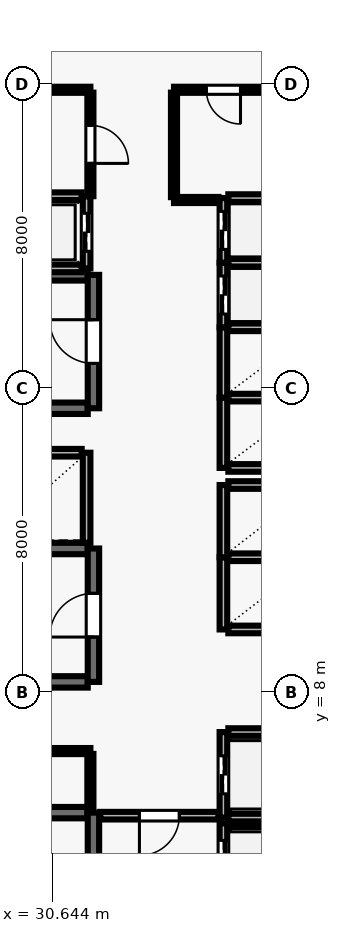
"""IFC4 building model, lengths in metres.
Left out: names, types, materials, properties, quantities, classifications, styles, units other than length and angle.
Written with IfcOpenShell. Run it as: python <this file> out.ifc"""

import sys

from ifc_helpers import new_model, si_unit, direction, frame, frame_2d, origin, place, context, subcontext, project, spatial, rectangle, extrude, element, fill, save


model = new_model("IFC4")
c1 = context("Model", 3, precision=1e-05, world=origin(), true_north=direction((0.0, 1.0)))
c2 = subcontext(c1, "Body", "Model", "MODEL_VIEW")
j1 = project(units=[si_unit("LENGTHUNIT", "METRE"), si_unit("PLANEANGLEUNIT", "RADIAN")], contexts=[c1])
p1 = place(None, origin())
s1 = spatial("IfcSite", under=j1, at=p1, CompositionType="ELEMENT")
p2 = place(p1, origin())
s2 = spatial("IfcBuilding", under=s1, at=p2, CompositionType="ELEMENT")
p3 = place(p2, frame((0.0, 0.0, 154.1)))
s3 = spatial("IfcBuildingStorey", under=s2, at=p3, CompositionType="ELEMENT", Elevation=154.1)
p4 = place(p3, frame((31.58, 4.83, 0.0), z_axis=(0.0, 0.0, 1.0), x_axis=(-1.0, 0.0, 0.0)))
e1 = element("IfcWall", 1, at=p4, inside=s3, PredefinedType="SHEAR", context=c2, shape_type="SweptSolid", body=[
    extrude(rectangle(XDim=8.36, YDim=0.3, at=frame_2d((4.18, 0.0))), origin(), (0.0, 0.0, 1.0), 3.69),
])
p5 = place(p3, frame((31.73, 0.96, 0.0), z_axis=(0.0, 0.0, 1.0), x_axis=(0.0, 1.0, 0.0)))
e2 = element("IfcWall", 2, at=p5, inside=s3, PredefinedType="SHEAR", context=c2, shape_type="SweptSolid", body=[
    extrude(rectangle(XDim=3.87, YDim=0.3, at=frame_2d((1.935, 0.0))), origin(), (0.0, 0.0, 1.0), 3.69),
])
p6 = place(p5, frame((1.54, 0.0, 0.0)))
e3 = element("IfcOpeningElement", 3, at=p6, cuts=e2, PredefinedType="OPENING", context=c2, shape_type="SweptSolid", body=[
    extrude(rectangle(XDim=1.15, YDim=2.15, at=frame_2d((0.575, 1.075))), frame((0.0, 0.16, 0.0), z_axis=(0.0, -1.0, 0.0), x_axis=(1.0, 0.0, 0.0)), (0.0, 0.0, 1.0), 0.32),
])
for number, where, z_axis, x_axis in (
    (4, (31.58, 18.98, 0.0), (0.0, 0.0, 1.0), (-1.0, 0.0, 0.0)),
    (5, (23.22, 15.47, 0.0), (0.0, 0.0, 1.0), (1.0, 0.0, 0.0)),
):
    element("IfcWall", number, at=place(p3, frame(where, z_axis=z_axis, x_axis=x_axis)), inside=s3, PredefinedType="SHEAR", context=c2, shape_type="SweptSolid", body=[
        extrude(rectangle(XDim=8.36, YDim=0.3, at=frame_2d((4.18, 0.0))), origin(), (0.0, 0.0, 1.0), 3.69),
    ])
p7 = place(p3, frame((31.73, 15.47, 0.0), z_axis=(0.0, 0.0, 1.0), x_axis=(0.0, 1.0, 0.0)))
e6 = element("IfcWall", 6, at=p7, inside=s3, PredefinedType="SHEAR", context=c2, shape_type="SweptSolid", body=[
    extrude(rectangle(XDim=3.51, YDim=0.3, at=frame_2d((1.755, 0.0))), origin(), (0.0, 0.0, 1.0), 3.69),
])
p8 = place(p7, frame((1.18, 0.0, 0.0)))
e7 = element("IfcOpeningElement", 7, at=p8, cuts=e6, PredefinedType="OPENING", context=c2, shape_type="SweptSolid", body=[
    extrude(rectangle(XDim=1.15, YDim=2.15, at=frame_2d((0.575, 1.075))), frame((0.0, 0.16, 0.0), z_axis=(0.0, -1.0, 0.0), x_axis=(1.0, 0.0, 0.0)), (0.0, 0.0, 1.0), 0.32),
])
for number, where, z_axis, x_axis in (
    (8, (31.58, 11.78, 0.0), (0.0, 0.0, 1.0), (-1.0, 0.0, 0.0)),
    (9, (23.22, 8.27, 0.0), (0.0, 0.0, 1.0), (1.0, 0.0, 0.0)),
):
    element("IfcWall", number, at=place(p3, frame(where, z_axis=z_axis, x_axis=x_axis)), inside=s3, PredefinedType="SHEAR", context=c2, shape_type="SweptSolid", body=[
        extrude(rectangle(XDim=8.36, YDim=0.3, at=frame_2d((4.18, 0.0))), origin(), (0.0, 0.0, 1.0), 3.69),
    ])
p9 = place(p3, frame((31.73, 8.27, 0.0), z_axis=(0.0, 0.0, 1.0), x_axis=(0.0, 1.0, 0.0)))
e10 = element("IfcWall", 10, at=p9, inside=s3, PredefinedType="SHEAR", context=c2, shape_type="SweptSolid", body=[
    extrude(rectangle(XDim=3.51, YDim=0.3, at=frame_2d((1.755, 0.0))), origin(), (0.0, 0.0, 1.0), 3.69),
])
p10 = place(p9, frame((1.18, 0.0, 0.0)))
e11 = element("IfcOpeningElement", 11, at=p10, cuts=e10, PredefinedType="OPENING", context=c2, shape_type="SweptSolid", body=[
    extrude(rectangle(XDim=1.15, YDim=2.15, at=frame_2d((0.575, 1.075))), frame((0.0, 0.16, 0.0), z_axis=(0.0, -1.0, 0.0), x_axis=(1.0, 0.0, 0.0)), (0.0, 0.0, 1.0), 0.32),
])
p11 = place(p3, frame((35.15, 4.55, 0.0), z_axis=(0.0, 0.0, 1.0), x_axis=(0.0, -1.0, 0.0)))
e12 = element("IfcWall", 12, at=p11, inside=s3, PredefinedType="SOLIDWALL", context=c2, shape_type="SweptSolid", body=[
    extrude(rectangle(XDim=2.1, YDim=0.2, at=frame_2d((1.05, 0.0))), origin(), (0.0, 0.0, 1.0), 3.69),
])
p12 = place(p11, frame((0.45, 0.0, 0.0)))
e13 = element("IfcOpeningElement", 13, at=p12, cuts=e12, PredefinedType="OPENING", context=c2, shape_type="SweptSolid", body=[
    extrude(rectangle(XDim=1.2, YDim=2.15, at=frame_2d((0.6, 1.075))), frame((0.0, 0.11, 0.0), z_axis=(0.0, -1.0, 0.0), x_axis=(1.0, 0.0, 0.0)), (0.0, 0.0, 1.0), 0.22),
])
p13 = place(p3, frame((37.42, 4.55, 0.0), z_axis=(0.0, 0.0, 1.0), x_axis=(-1.0, 0.0, 0.0)))
e14 = element("IfcWall", 14, at=p13, inside=s3, PredefinedType="SOLIDWALL", context=c2, shape_type="SweptSolid", body=[
    extrude(rectangle(XDim=2.14, YDim=0.2, at=frame_2d((1.07, 0.0))), origin(), (0.0, 0.0, 1.0), 3.69),
])
p14 = place(p3, frame((35.15, 6.95, 0.0), z_axis=(0.0, 0.0, 1.0), x_axis=(0.0, -1.0, 0.0)))
e15 = element("IfcWall", 15, at=p14, inside=s3, PredefinedType="SOLIDWALL", context=c2, shape_type="SweptSolid", body=[
    extrude(rectangle(XDim=2.25, YDim=0.2, at=frame_2d((1.125, 0.0))), origin(), (0.0, 0.0, 1.0), 3.69),
])
p15 = place(p14, frame((0.625, 0.0, 0.0)))
e16 = element("IfcOpeningElement", 16, at=p15, cuts=e15, PredefinedType="OPENING", context=c2, shape_type="SweptSolid", body=[
    extrude(rectangle(XDim=1.0, YDim=2.1, at=frame_2d((0.5, 1.05))), frame((0.0, 0.11, 0.0), z_axis=(0.0, -1.0, 0.0), x_axis=(1.0, 0.0, 0.0)), (0.0, 0.0, 1.0), 0.22),
])
for number, where, z_axis, x_axis in (
    (17, (35.28, 4.7, 0.0), (0.0, 0.0, 1.0), (1.0, 0.0, 0.0)),
    (18, (37.42, 6.95, 0.0), (0.0, 0.0, 1.0), (-1.0, 0.0, 0.0)),
):
    element("IfcWall", number, at=place(p3, frame(where, z_axis=z_axis, x_axis=x_axis)), inside=s3, PredefinedType="SOLIDWALL", context=c2, shape_type="SweptSolid", body=[
        extrude(rectangle(XDim=2.14, YDim=0.2, at=frame_2d((1.07, 0.0))), origin(), (0.0, 0.0, 1.0), 3.69),
    ])
p16 = place(p3, frame((35.15, 11.55, 0.0), z_axis=(0.0, 0.0, 1.0), x_axis=(0.0, -1.0, 0.0)))
e19 = element("IfcWall", 19, at=p16, inside=s3, PredefinedType="SOLIDWALL", context=c2, shape_type="SweptSolid", body=[
    extrude(rectangle(XDim=1.9, YDim=0.2, at=frame_2d((0.95, 0.0))), origin(), (0.0, 0.0, 1.0), 3.69),
])
for number, where, z_axis, x_axis in (
    (20, (35.28, 9.65, 0.0), (0.0, 0.0, 1.0), (1.0, 0.0, 0.0)),
    (21, (37.42, 11.55, 0.0), (0.0, 0.0, 1.0), (-1.0, 0.0, 0.0)),
):
    element("IfcWall", number, at=place(p3, frame(where, z_axis=z_axis, x_axis=x_axis)), inside=s3, PredefinedType="SOLIDWALL", context=c2, shape_type="SweptSolid", body=[
        extrude(rectangle(XDim=2.14, YDim=0.2, at=frame_2d((1.07, 0.0))), origin(), (0.0, 0.0, 1.0), 3.69),
    ])
p17 = place(p3, frame((35.15, 13.45, 0.0), z_axis=(0.0, 0.0, 1.0), x_axis=(0.0, -1.0, 0.0)))
e22 = element("IfcWall", 22, at=p17, inside=s3, PredefinedType="SOLIDWALL", context=c2, shape_type="SweptSolid", body=[
    extrude(rectangle(XDim=1.9, YDim=0.2, at=frame_2d((0.95, 0.0))), origin(), (0.0, 0.0, 1.0), 3.69),
])
p18 = place(p3, frame((37.42, 13.45, 0.0), z_axis=(0.0, 0.0, 1.0), x_axis=(-1.0, 0.0, 0.0)))
e23 = element("IfcWall", 23, at=p18, inside=s3, PredefinedType="SOLIDWALL", context=c2, shape_type="SweptSolid", body=[
    extrude(rectangle(XDim=2.14, YDim=0.2, at=frame_2d((1.07, 0.0))), origin(), (0.0, 0.0, 1.0), 3.69),
])
p19 = place(p3, frame((31.55, 11.93, 0.0), z_axis=(0.0, 0.0, 1.0), x_axis=(0.0, 1.0, 0.0)))
e24 = element("IfcWall", 24, at=p19, inside=s3, PredefinedType="SOLIDWALL", context=c2, shape_type="SweptSolid", body=[
    extrude(rectangle(XDim=2.37, YDim=0.2, at=frame_2d((1.185, 0.0))), origin(), (0.0, 0.0, 1.0), 3.69),
])
p20 = place(p3, frame((31.42, 14.3, 0.0), z_axis=(0.0, 0.0, 1.0), x_axis=(-1.0, 0.0, 0.0)))
e25 = element("IfcWall", 25, at=p20, inside=s3, PredefinedType="SOLIDWALL", context=c2, shape_type="SweptSolid", body=[
    extrude(rectangle(XDim=2.44, YDim=0.2, at=frame_2d((1.22, 0.0))), origin(), (0.0, 0.0, 1.0), 3.69),
])
p21 = place(p3, frame((35.15, 15.75, 0.0), z_axis=(0.0, 0.0, 1.0), x_axis=(0.0, -1.0, 0.0)))
e26 = element("IfcWall", 26, at=p21, inside=s3, PredefinedType="SOLIDWALL", context=c2, shape_type="SweptSolid", body=[
    extrude(rectangle(XDim=1.85, YDim=0.2, at=frame_2d((0.925, 0.0))), origin(), (0.0, 0.0, 1.0), 3.69),
])
for number, where, z_axis, x_axis in (
    (27, (35.28, 13.9, 0.0), (0.0, 0.0, 1.0), (1.0, 0.0, 0.0)),
    (28, (37.42, 15.75, 0.0), (0.0, 0.0, 1.0), (-1.0, 0.0, 0.0)),
):
    element("IfcWall", number, at=place(p3, frame(where, z_axis=z_axis, x_axis=x_axis)), inside=s3, PredefinedType="SOLIDWALL", context=c2, shape_type="SweptSolid", body=[
        extrude(rectangle(XDim=2.14, YDim=0.2, at=frame_2d((1.07, 0.0))), origin(), (0.0, 0.0, 1.0), 3.69),
    ])
p22 = place(p3, frame((35.15, 17.6, 0.0), z_axis=(0.0, 0.0, 1.0), x_axis=(0.0, -1.0, 0.0)))
e29 = element("IfcWall", 29, at=p22, inside=s3, PredefinedType="SOLIDWALL", context=c2, shape_type="SweptSolid", body=[
    extrude(rectangle(XDim=1.85, YDim=0.2, at=frame_2d((0.925, 0.0))), origin(), (0.0, 0.0, 1.0), 3.69),
])
p23 = place(p3, frame((37.42, 17.6, 0.0), z_axis=(0.0, 0.0, 1.0), x_axis=(-1.0, 0.0, 0.0)))
e30 = element("IfcWall", 30, at=p23, inside=s3, PredefinedType="SOLIDWALL", context=c2, shape_type="SweptSolid", body=[
    extrude(rectangle(XDim=2.14, YDim=0.2, at=frame_2d((1.07, 0.0))), origin(), (0.0, 0.0, 1.0), 3.69),
])
p24 = place(p3, frame((35.15, 19.3, 0.0), z_axis=(0.0, 0.0, 1.0), x_axis=(0.0, -1.0, 0.0)))
e31 = element("IfcWall", 31, at=p24, inside=s3, PredefinedType="SOLIDWALL", context=c2, shape_type="SweptSolid", body=[
    extrude(rectangle(XDim=1.7, YDim=0.2, at=frame_2d((0.85, 0.0))), origin(), (0.0, 0.0, 1.0), 3.69),
])
p25 = place(p24, frame((0.35, 0.0, 0.0)))
e32 = element("IfcOpeningElement", 32, at=p25, cuts=e31, PredefinedType="OPENING", context=c2, shape_type="SweptSolid", body=[
    extrude(rectangle(XDim=1.0, YDim=2.1, at=frame_2d((0.5, 1.05))), frame((0.0, 0.11, 0.0), z_axis=(0.0, -1.0, 0.0), x_axis=(1.0, 0.0, 0.0)), (0.0, 0.0, 1.0), 0.22),
])
p26 = place(p3, frame((37.42, 19.3, 0.0), z_axis=(0.0, 0.0, 1.0), x_axis=(-1.0, 0.0, 0.0)))
e33 = element("IfcWall", 33, at=p26, inside=s3, PredefinedType="SOLIDWALL", context=c2, shape_type="SweptSolid", body=[
    extrude(rectangle(XDim=2.14, YDim=0.2, at=frame_2d((1.07, 0.0))), origin(), (0.0, 0.0, 1.0), 3.69),
])
p27 = place(p3, frame((35.15, 21.0, 0.0), z_axis=(0.0, 0.0, 1.0), x_axis=(0.0, -1.0, 0.0)))
e34 = element("IfcWall", 34, at=p27, inside=s3, PredefinedType="SOLIDWALL", context=c2, shape_type="SweptSolid", body=[
    extrude(rectangle(XDim=1.7, YDim=0.2, at=frame_2d((0.85, 0.0))), origin(), (0.0, 0.0, 1.0), 3.69),
])
p28 = place(p27, frame((0.35, 0.0, 0.0)))
e35 = element("IfcOpeningElement", 35, at=p28, cuts=e34, PredefinedType="OPENING", context=c2, shape_type="SweptSolid", body=[
    extrude(rectangle(XDim=1.0, YDim=2.1, at=frame_2d((0.5, 1.05))), frame((0.0, 0.11, 0.0), z_axis=(0.0, -1.0, 0.0), x_axis=(1.0, 0.0, 0.0)), (0.0, 0.0, 1.0), 0.22),
])
p29 = place(p3, frame((37.42, 21.0, 0.0), z_axis=(0.0, 0.0, 1.0), x_axis=(-1.0, 0.0, 0.0)))
e36 = element("IfcWall", 36, at=p29, inside=s3, PredefinedType="SOLIDWALL", context=c2, shape_type="SweptSolid", body=[
    extrude(rectangle(XDim=2.14, YDim=0.2, at=frame_2d((1.07, 0.0))), origin(), (0.0, 0.0, 1.0), 3.69),
])
p30 = place(p3, frame((31.55, 19.15, 0.0), z_axis=(0.0, 0.0, 1.0), x_axis=(0.0, 1.0, 0.0)))
e37 = element("IfcWall", 37, at=p30, inside=s3, PredefinedType="SOLIDWALL", context=c2, shape_type="SweptSolid", body=[
    extrude(rectangle(XDim=1.9, YDim=0.2, at=frame_2d((0.95, 0.0))), origin(), (0.0, 0.0, 1.0), 3.69),
])
p31 = place(p30, frame((0.45, 0.0, 0.0)))
e38 = element("IfcOpeningElement", 38, at=p31, cuts=e37, PredefinedType="OPENING", context=c2, shape_type="SweptSolid", body=[
    extrude(rectangle(XDim=1.0, YDim=2.1, at=frame_2d((0.5, 1.05))), frame((0.0, 0.11, 0.0), z_axis=(0.0, -1.0, 0.0), x_axis=(1.0, 0.0, 0.0)), (0.0, 0.0, 1.0), 0.22),
])
for number, where, z_axis, x_axis in (
    (39, (28.98, 19.15, 0.0), (0.0, 0.0, 1.0), (1.0, 0.0, 0.0)),
    (40, (31.42, 21.05, 0.0), (0.0, 0.0, 1.0), (-1.0, 0.0, 0.0)),
):
    element("IfcWall", number, at=place(p3, frame(where, z_axis=z_axis, x_axis=x_axis)), inside=s3, PredefinedType="SOLIDWALL", context=c2, shape_type="SweptSolid", body=[
        extrude(rectangle(XDim=2.44, YDim=0.2, at=frame_2d((1.22, 0.0))), origin(), (0.0, 0.0, 1.0), 3.69),
    ])
p32 = place(p3, frame((28.55, 6.45, 0.0), z_axis=(0.0, 0.0, 1.0), x_axis=(1.0, 0.0, 0.0)))
e41 = element("IfcWall", 41, at=p32, inside=s3, PredefinedType="PARTITIONING", context=c2, shape_type="SweptSolid", body=[
    extrude(rectangle(XDim=3.1, YDim=0.16, at=frame_2d((1.55, 0.0))), origin(), (0.0, 0.0, 1.0), 3.69),
])
p33 = place(p32, frame((1.11, 0.0, 0.0)))
e42 = element("IfcOpeningElement", 42, at=p33, cuts=e41, PredefinedType="OPENING", context=c2, shape_type="SweptSolid", body=[
    extrude(rectangle(XDim=0.88, YDim=2.1, at=frame_2d((0.44, 1.05))), frame((0.0, 0.09, 0.0), z_axis=(0.0, -1.0, 0.0), x_axis=(1.0, 0.0, 0.0)), (0.0, 0.0, 1.0), 0.18),
])
p34 = place(p3, frame((31.65, 23.85, 0.0), z_axis=(0.0, 0.0, 1.0), x_axis=(-1.0, 0.0, 0.0)))
e43 = element("IfcWall", 43, at=p34, inside=s3, PredefinedType="PARTITIONING", context=c2, shape_type="SweptSolid", body=[
    extrude(rectangle(XDim=2.85, YDim=0.16, at=frame_2d((1.425, 0.0))), origin(), (0.0, 0.0, 1.0), 3.073),
])
p35 = place(p3, frame((35.02, 4.75, 0.0), z_axis=(0.0, 0.0, 1.0), x_axis=(-1.0, 0.0, 0.0)))
e44 = element("IfcWall", 44, at=p35, inside=s3, PredefinedType="SOLIDWALL", context=c2, shape_type="SweptSolid", body=[
    extrude(rectangle(XDim=3.11, YDim=0.2, at=frame_2d((1.555, 0.0))), origin(), (0.0, 0.0, 1.0), 3.69),
])
p36 = place(p35, frame((1.03, 0.0, 0.0)))
e45 = element("IfcOpeningElement", 45, at=p36, cuts=e44, PredefinedType="OPENING", context=c2, shape_type="SweptSolid", body=[
    extrude(rectangle(XDim=1.05, YDim=2.15, at=frame_2d((0.525, 1.075))), frame((0.0, 0.11, 0.0), z_axis=(0.0, -1.0, 0.0), x_axis=(1.0, 0.0, 0.0)), (0.0, 0.0, 1.0), 0.22),
])
p37 = place(p3, frame((35.02, 20.95, 0.0), z_axis=(0.0, 0.0, 1.0), x_axis=(-1.0, 0.0, 0.0)))
e46 = element("IfcWall", 46, at=p37, inside=s3, PredefinedType="PARTITIONING", context=c2, shape_type="SweptSolid", body=[
    extrude(rectangle(XDim=1.17, YDim=0.16, at=frame_2d((0.585, 0.0))), origin(), (0.0, 0.0, 1.0), 3.69),
])
p38 = place(p3, frame((37.85, 23.85, 0.0), z_axis=(0.0, 0.0, 1.0), x_axis=(-1.0, 0.0, 0.0)))
e47 = element("IfcWall", 47, at=p38, inside=s3, PredefinedType="PARTITIONING", context=c2, shape_type="SweptSolid", body=[
    extrude(rectangle(XDim=4.0, YDim=0.16, at=frame_2d((2.0, 0.0))), origin(), (0.0, 0.0, 1.0), 3.073),
])
p39 = place(p38, frame((2.25, 0.0, 0.0)))
e48 = element("IfcOpeningElement", 48, at=p39, cuts=e47, PredefinedType="OPENING", context=c2, shape_type="SweptSolid", body=[
    extrude(rectangle(XDim=0.9, YDim=2.1, at=frame_2d((0.45, 1.05))), frame((0.0, 0.09, 0.0), z_axis=(0.0, -1.0, 0.0), x_axis=(1.0, 0.0, 0.0)), (0.0, 0.0, 1.0), 0.18),
])
p40 = place(p3, frame((31.65, 4.86, 0.0), z_axis=(0.0, 0.0, 1.0), x_axis=(0.0, 1.0, 0.0)))
e49 = element("IfcWall", 49, at=p40, inside=s3, PredefinedType="PARTITIONING", context=c2, shape_type="SweptSolid", body=[
    extrude(rectangle(XDim=1.515, YDim=0.16, at=frame_2d((0.757, 0.0))), origin(), (0.0, 0.0, 1.0), 3.69),
])
p41 = place(p3, frame((31.65, 23.775, 0.0), z_axis=(0.0, 0.0, 1.0), x_axis=(0.0, -1.0, 0.0)))
e50 = element("IfcWall", 50, at=p41, inside=s3, PredefinedType="PARTITIONING", context=c2, shape_type="SweptSolid", body=[
    extrude(rectangle(XDim=2.725, YDim=0.16, at=frame_2d((1.362, 0.0))), origin(), (0.0, 0.0, 1.0), 3.69),
])
p42 = place(p41, frame((0.862, 0.0, 0.0)))
e51 = element("IfcOpeningElement", 51, at=p42, cuts=e50, PredefinedType="OPENING", context=c2, shape_type="SweptSolid", body=[
    extrude(rectangle(XDim=1.0, YDim=2.1, at=frame_2d((0.5, 1.05))), frame((0.0, 0.09, 0.0), z_axis=(0.0, -1.0, 0.0), x_axis=(1.0, 0.0, 0.0)), (0.0, 0.0, 1.0), 0.18),
])
p43 = place(p3, frame((33.85, 21.025, 0.0), z_axis=(0.0, 0.0, 1.0), x_axis=(0.0, 1.0, 0.0)))
e52 = element("IfcWall", 52, at=p43, inside=s3, PredefinedType="PARTITIONING", context=c2, shape_type="SweptSolid", body=[
    extrude(rectangle(XDim=2.75, YDim=0.16, at=frame_2d((1.375, 0.0))), origin(), (0.0, 0.0, 1.0), 3.69),
])
p44 = place(p8, origin())
e53 = element("IfcDoor", 53, at=p44, inside=s3, OperationType="SINGLE_SWING_RIGHT", PredefinedType="DOOR", context=c2, shape_type="SweptSolid", body=[
    extrude(rectangle(XDim=1.15, YDim=2.15, at=frame_2d((0.575, 1.075))), frame((0.0, 0.025, 0.0), z_axis=(0.0, -1.0, 0.0), x_axis=(1.0, 0.0, 0.0)), (0.0, 0.0, 1.0), 0.05),
])
fill(e7, e53)
p45 = place(p10, origin())
e54 = element("IfcDoor", 54, at=p45, inside=s3, OperationType="SINGLE_SWING_LEFT", PredefinedType="DOOR", context=c2, shape_type="SweptSolid", body=[
    extrude(rectangle(XDim=1.15, YDim=2.15, at=frame_2d((0.575, 1.075))), frame((0.0, 0.025, 0.0), z_axis=(0.0, -1.0, 0.0), x_axis=(1.0, 0.0, 0.0)), (0.0, 0.0, 1.0), 0.05),
])
fill(e11, e54)
p46 = place(p12, origin())
e55 = element("IfcDoor", 55, at=p46, inside=s3, OperationType="DOUBLE_DOOR_SLIDING", PredefinedType="DOOR", context=c2, shape_type="SweptSolid", body=[
    extrude(rectangle(XDim=1.2, YDim=2.15, at=frame_2d((0.6, 1.075))), frame((0.0, 0.025, 0.0), z_axis=(0.0, -1.0, 0.0), x_axis=(1.0, 0.0, 0.0)), (0.0, 0.0, 1.0), 0.05),
])
fill(e13, e55)
p47 = place(p15, origin())
e56 = element("IfcDoor", 56, at=p47, inside=s3, OperationType="DOUBLE_DOOR_SLIDING", PredefinedType="DOOR", context=c2, shape_type="SweptSolid", body=[
    extrude(rectangle(XDim=1.0, YDim=2.1, at=frame_2d((0.5, 1.05))), frame((0.0, 0.025, 0.0), z_axis=(0.0, -1.0, 0.0), x_axis=(1.0, 0.0, 0.0)), (0.0, 0.0, 1.0), 0.05),
])
fill(e16, e56)
p48 = place(p25, origin())
e57 = element("IfcDoor", 57, at=p48, inside=s3, OperationType="DOUBLE_DOOR_SLIDING", PredefinedType="DOOR", context=c2, shape_type="SweptSolid", body=[
    extrude(rectangle(XDim=1.0, YDim=2.1, at=frame_2d((0.5, 1.05))), frame((0.0, 0.025, 0.0), z_axis=(0.0, -1.0, 0.0), x_axis=(1.0, 0.0, 0.0)), (0.0, 0.0, 1.0), 0.05),
])
fill(e32, e57)
p49 = place(p28, origin())
e58 = element("IfcDoor", 58, at=p49, inside=s3, OperationType="DOUBLE_DOOR_SLIDING", PredefinedType="DOOR", context=c2, shape_type="SweptSolid", body=[
    extrude(rectangle(XDim=1.0, YDim=2.1, at=frame_2d((0.5, 1.05))), frame((0.0, 0.025, 0.0), z_axis=(0.0, -1.0, 0.0), x_axis=(1.0, 0.0, 0.0)), (0.0, 0.0, 1.0), 0.05),
])
fill(e35, e58)
p50 = place(p31, origin())
e59 = element("IfcDoor", 59, at=p50, inside=s3, OperationType="DOUBLE_DOOR_SLIDING", PredefinedType="DOOR", context=c2, shape_type="SweptSolid", body=[
    extrude(rectangle(XDim=1.0, YDim=2.1, at=frame_2d((0.5, 1.05))), frame((0.0, 0.025, 0.0), z_axis=(0.0, -1.0, 0.0), x_axis=(1.0, 0.0, 0.0)), (0.0, 0.0, 1.0), 0.05),
])
fill(e38, e59)
p51 = place(p36, origin())
e60 = element("IfcDoor", 60, at=p51, inside=s3, OperationType="SINGLE_SWING_RIGHT", PredefinedType="DOOR", context=c2, shape_type="SweptSolid", body=[
    extrude(rectangle(XDim=1.05, YDim=2.15, at=frame_2d((0.525, 1.075))), frame((0.0, 0.025, 0.0), z_axis=(0.0, -1.0, 0.0), x_axis=(1.0, 0.0, 0.0)), (0.0, 0.0, 1.0), 0.05),
])
fill(e45, e60)
p52 = place(p39, origin())
e61 = element("IfcDoor", 61, at=p52, inside=s3, OperationType="SINGLE_SWING_LEFT", PredefinedType="DOOR", context=c2, shape_type="SweptSolid", body=[
    extrude(rectangle(XDim=0.9, YDim=2.1, at=frame_2d((0.45, 1.05))), frame((0.0, 0.025, 0.0), z_axis=(0.0, -1.0, 0.0), x_axis=(1.0, 0.0, 0.0)), (0.0, 0.0, 1.0), 0.05),
])
fill(e48, e61)
p53 = place(p42, origin())
e62 = element("IfcDoor", 62, at=p53, inside=s3, OperationType="SINGLE_SWING_RIGHT", PredefinedType="DOOR", context=c2, shape_type="SweptSolid", body=[
    extrude(rectangle(XDim=1.0, YDim=2.1, at=frame_2d((0.5, 1.05))), frame((0.0, 0.025, 0.0), z_axis=(0.0, -1.0, 0.0), x_axis=(1.0, 0.0, 0.0)), (0.0, 0.0, 1.0), 0.05),
])
fill(e51, e62)
save(model, sys.argv[1])
